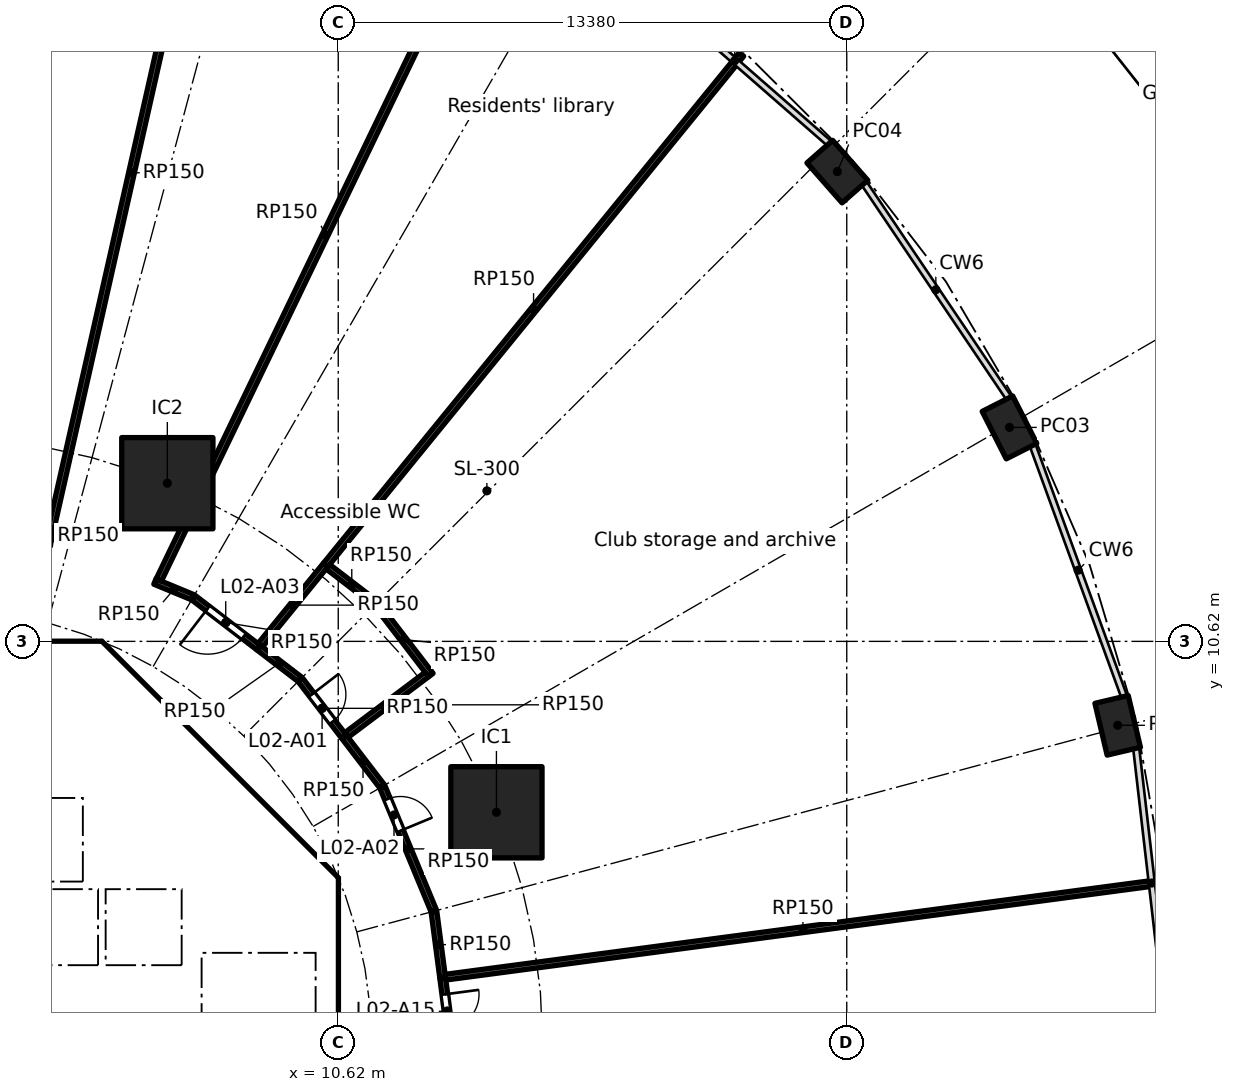
"""IFC4 building model, lengths in metres.
Left out: names, types, materials, properties, quantities, classifications, styles, units other than length and angle.
Written with IfcOpenShell. Run it as: python <this file> out.ifc"""

import sys

from ifc_helpers import new_model, si_unit, direction, frame, frame_2d, origin, origin_2d, place, context, subcontext, project, spatial, polyline, rectangle, hollow_rectangle, outline, extrude, element, fill, save


model = new_model("IFC4")
c1 = context("Model", 3, precision=1e-05, world=origin(), true_north=direction((0.0, 1.0)))
c2 = subcontext(c1, "Body", "Model", "MODEL_VIEW")
j1 = project(units=[si_unit("LENGTHUNIT", "METRE"), si_unit("PLANEANGLEUNIT", "RADIAN")], contexts=[c1])
p1 = place(None, origin())
s1 = spatial("IfcSite", under=j1, at=p1, CompositionType="ELEMENT")
p2 = place(p1, origin())
s2 = spatial("IfcBuilding", under=s1, at=p2, CompositionType="ELEMENT")
p3 = place(p2, frame((0.0, 0.0, 12.0)))
s3 = spatial("IfcBuildingStorey", under=s2, at=p3, CompositionType="ELEMENT", Elevation=12.0)
for number, where, z_axis, x_axis in (
    (1, (31.129, 8.412, 0.0), (0.0, 0.0, 1.0), (-0.229, 0.973, 0.0)),
    (2, (28.282, 16.25, 0.0), (0.0, 0.0, 1.0), (-0.452, 0.892, 0.0)),
    (3, (23.752, 22.981, 0.0), (0.0, 0.0, 1.0), (-0.66, 0.751, 0.0)),
):
    element("IfcColumn", number, at=place(p3, frame(where, z_axis=z_axis, x_axis=x_axis)), inside=s3, PredefinedType="COLUMN", context=c2, shape_type="SweptSolid", body=[
        extrude(hollow_rectangle(XDim=1.4, YDim=0.9, WallThickness=0.05, at=origin_2d()), origin(), (0.0, 0.0, 1.0), 5.0),
    ])
for number, where, z_axis, x_axis in (
    (4, (14.782, 6.123, 0.0), (0.0, 0.0, 1.0), (1.0, 0.0, 0.0)),
    (5, (6.123, 14.782, 0.0), (0.0, 0.0, 1.0), (1.0, 0.0, 0.0)),
):
    element("IfcColumn", number, at=place(p3, frame(where, z_axis=z_axis, x_axis=x_axis)), inside=s3, PredefinedType="COLUMN", context=c2, shape_type="SweptSolid", body=[
        extrude(rectangle(XDim=2.4, YDim=2.4, at=origin_2d()), origin(), (0.0, 0.0, 1.0), 5.0),
    ])
p4 = place(p3, frame((9.988, 4.613, 0.0), z_axis=(0.0, 0.0, 1.0), x_axis=(-0.707106781187, 0.707106781187, 0.0)))
e6 = element("IfcWall", 6, at=p4, inside=s3, PredefinedType="SHEAR", context=c2, shape_type="SweptSolid", body=[
    extrude(rectangle(XDim=7.602, YDim=0.6, at=frame_2d((3.801, 0.0))), origin(), (0.0, 0.0, 1.0), 4.7),
])
p5 = place(p4, frame((3.201, 0.0, 0.0)))
e7 = element("IfcOpeningElement", 7, at=p5, cuts=e6, PredefinedType="OPENING", context=c2, shape_type="SweptSolid", body=[
    extrude(rectangle(XDim=1.2, YDim=2.1, at=frame_2d((0.6, 1.05))), frame((0.0, 0.31, 0.0), z_axis=(0.0, -1.0, 0.0), x_axis=(1.0, 0.0, 0.0)), (0.0, 0.0, 1.0), 0.62),
])
p6 = place(p3, frame((4.0, 4.3, 0.0), z_axis=(0.0, 0.0, 1.0), x_axis=(0.0, 1.0, 0.0)))
e8 = element("IfcWall", 8, at=p6, inside=s3, PredefinedType="SOLIDWALL", context=c2, shape_type="SweptSolid", body=[
    extrude(rectangle(XDim=2.2, YDim=0.2, at=frame_2d((1.1, 0.0))), origin(), (0.0, 0.0, 1.0), 4.7),
])
p7 = place(p6, frame((0.55, 0.0, 0.0)))
e9 = element("IfcOpeningElement", 9, at=p7, cuts=e8, PredefinedType="OPENING", context=c2, shape_type="SweptSolid", body=[
    extrude(rectangle(XDim=1.1, YDim=2.1, at=frame_2d((0.55, 1.05))), frame((0.0, 0.11, 0.0), z_axis=(0.0, -1.0, 0.0), x_axis=(1.0, 0.0, 0.0)), (0.0, 0.0, 1.0), 0.22),
])
p8 = place(p3, frame((-6.7, 2.0, 0.0), z_axis=(0.0, 0.0, 1.0), x_axis=(1.0, 0.0, 0.0)))
e10 = element("IfcWall", 10, at=p8, inside=s3, PredefinedType="SOLIDWALL", context=c2, shape_type="SweptSolid", body=[
    extrude(rectangle(XDim=13.4, YDim=0.2, at=frame_2d((6.7, 0.0))), origin(), (0.0, 0.0, 1.0), 4.7),
])
p9 = place(p8, frame((0.65, 0.0, 0.0)))
e11 = element("IfcOpeningElement", 11, at=p9, cuts=e10, PredefinedType="OPENING", context=c2, shape_type="SweptSolid", body=[
    extrude(rectangle(XDim=1.1, YDim=2.1, at=frame_2d((0.55, 1.05))), frame((0.0, 0.11, 0.0), z_axis=(0.0, -1.0, 0.0), x_axis=(1.0, 0.0, 0.0)), (0.0, 0.0, 1.0), 0.22),
])
p10 = place(p8, frame((2.85, 0.0, 0.0)))
e12 = element("IfcOpeningElement", 12, at=p10, cuts=e10, PredefinedType="OPENING", context=c2, shape_type="SweptSolid", body=[
    extrude(rectangle(XDim=1.1, YDim=2.1, at=frame_2d((0.55, 1.05))), frame((0.0, 0.11, 0.0), z_axis=(0.0, -1.0, 0.0), x_axis=(1.0, 0.0, 0.0)), (0.0, 0.0, 1.0), 0.22),
])
p11 = place(p8, frame((5.05, 0.0, 0.0)))
e13 = element("IfcOpeningElement", 13, at=p11, cuts=e10, PredefinedType="OPENING", context=c2, shape_type="SweptSolid", body=[
    extrude(rectangle(XDim=1.1, YDim=2.1, at=frame_2d((0.55, 1.05))), frame((0.0, 0.11, 0.0), z_axis=(0.0, -1.0, 0.0), x_axis=(1.0, 0.0, 0.0)), (0.0, 0.0, 1.0), 0.22),
])
p12 = place(p3, frame((6.7, 4.0, 0.0), z_axis=(0.0, 0.0, 1.0), x_axis=(1.0, 0.0, 0.0)))
e14 = element("IfcWall", 14, at=p12, inside=s3, PredefinedType="SOLIDWALL", context=c2, shape_type="SweptSolid", body=[
    extrude(rectangle(XDim=3.325, YDim=0.2, at=frame_2d((1.662, 0.0))), origin(), (0.0, 0.0, 1.0), 4.7),
])
p13 = place(p12, frame((1.25, 0.0, 0.0)))
e15 = element("IfcOpeningElement", 15, at=p13, cuts=e14, PredefinedType="OPENING", context=c2, shape_type="SweptSolid", body=[
    extrude(rectangle(XDim=1.1, YDim=2.1, at=frame_2d((0.55, 1.05))), frame((0.0, 0.11, 0.0), z_axis=(0.0, -1.0, 0.0), x_axis=(1.0, 0.0, 0.0)), (0.0, 0.0, 1.0), 0.22),
])
p14 = place(p3, frame((4.0, 7.025, 0.0), z_axis=(0.0, 0.0, 1.0), x_axis=(0.0, 1.0, 0.0)))
e16 = element("IfcWall", 16, at=p14, inside=s3, PredefinedType="SOLIDWALL", context=c2, shape_type="SweptSolid", body=[
    extrude(rectangle(XDim=3.0, YDim=0.2, at=frame_2d((1.5, 0.0))), origin(), (0.0, 0.0, 1.0), 4.7),
])
p15 = place(p14, frame((0.925, 0.0, 0.0)))
e17 = element("IfcOpeningElement", 17, at=p15, cuts=e16, PredefinedType="OPENING", context=c2, shape_type="SweptSolid", body=[
    extrude(rectangle(XDim=1.1, YDim=2.1, at=frame_2d((0.55, 1.05))), frame((0.0, 0.11, 0.0), z_axis=(0.0, -1.0, 0.0), x_axis=(1.0, 0.0, 0.0)), (0.0, 0.0, 1.0), 0.22),
])
p16 = place(p3, origin())
e18 = element("IfcWall", 18, at=p16, inside=s3, PredefinedType="SHEAR", context=c2, shape_type="SweptSolid", body=[
    extrude(outline(polyline([(-4.152, 10.025), (-4.401, 9.776), (-4.825, 10.2), (-4.401, 10.625), (4.401, 10.625), (4.825, 10.2), (4.401, 9.776), (4.152, 10.025), (-4.152, 10.025)])), origin(), (0.0, 0.0, 1.0), 4.7),
])
p17 = place(p3, origin())
e19 = element("IfcWall", 19, at=p17, inside=s3, PredefinedType="SHEAR", context=c2, shape_type="SweptSolid", body=[
    extrude(outline(polyline([(9.776, -4.401), (10.025, -4.152), (10.025, -3.801), (10.025, 4.152), (9.776, 4.401), (10.2, 4.825), (10.625, 4.401), (10.625, -4.401), (10.2, -4.825), (9.776, -4.401)])), origin(), (0.0, 0.0, 1.0), 4.7),
])
p18 = place(p3, origin())
e20 = element("IfcWall", 20, at=p18, inside=s3, PredefinedType="SOLIDWALL", context=c2, shape_type="SweptSolid", body=[
    extrude(outline(polyline([(-6.5, 2.1), (-6.7, 2.1), (-6.7, 4.3), (6.7, 4.3), (6.7, 2.1), (6.5, 2.1), (6.5, 4.1), (4.5, 4.1), (4.5, 2.1), (4.3, 2.1), (4.3, 4.1), (2.3, 4.1), (2.3, 2.1), (2.1, 2.1), (2.1, 4.1), (0.1, 4.1), (0.1, 2.1), (-0.1, 2.1), (-0.1, 4.1), (-2.1, 4.1), (-2.1, 2.1), (-2.3, 2.1), (-2.3, 4.1), (-4.3, 4.1), (-4.3, 2.1), (-4.5, 2.1), (-4.5, 4.1), (-6.5, 4.1), (-6.5, 2.1)])), origin(), (0.0, 0.0, 1.0), 4.7),
])
p19 = place(p3, origin())
e21 = element("IfcWall", 21, at=p19, inside=s3, PredefinedType="SOLIDWALL", context=c2, shape_type="SweptSolid", body=[
    extrude(outline(polyline([(4.1, 6.5), (-4.1, 6.5), (-4.1, 7.025), (4.1, 7.025), (4.1, 6.5)])), origin(), (0.0, 0.0, 1.0), 4.7),
])
p20 = place(p3, origin())
e22 = element("IfcWall", 22, at=p20, inside=s3, PredefinedType="SOLIDWALL", context=c2, shape_type="SweptSolid", body=[
    extrude(outline(polyline([(7.025, -3.9), (6.7, -3.9), (6.7, 3.9), (7.025, 3.9), (7.025, -3.9)])), origin(), (0.0, 0.0, 1.0), 4.7),
])
p21 = place(p3, frame((2.998, 13.281, 0.0), z_axis=(0.0, 0.0, 1.0), x_axis=(0.220191699756, 0.975456618901, 0.0)))
e23 = element("IfcWall", 23, at=p21, inside=s3, PredefinedType="PARTITIONING", context=c2, shape_type="SweptSolid", body=[
    extrude(rectangle(XDim=19.825, YDim=0.15, at=frame_2d((9.912, 0.0))), origin(), (0.0, 0.0, 1.0), 4.7),
])
p22 = place(p3, frame((5.795, 12.194, 0.0), z_axis=(0.0, 0.0, 1.0), x_axis=(0.923867429555, -0.382712650179, 0.0)))
e24 = element("IfcWall", 24, at=p22, inside=s3, PredefinedType="PARTITIONING", context=c2, shape_type="SweptSolid", body=[
    extrude(rectangle(XDim=1.075, YDim=0.15, at=frame_2d((0.538, 0.0))), origin(), (0.0, 0.0, 1.0), 4.7),
])
p23 = place(p3, frame((6.809, 11.771, 0.0), z_axis=(0.0, 0.0, 1.0), x_axis=(0.793372937326, -0.608735888805, 0.0)))
e25 = element("IfcWall", 25, at=p23, inside=s3, PredefinedType="PARTITIONING", context=c2, shape_type="SweptSolid", body=[
    extrude(rectangle(XDim=2.155, YDim=0.15, at=frame_2d((1.078, 0.0))), origin(), (0.0, 0.0, 1.0), 4.7),
])
p24 = place(p23, frame((0.472, 0.0, 0.0)))
e26 = element("IfcOpeningElement", 26, at=p24, cuts=e25, PredefinedType="OPENING", context=c2, shape_type="SweptSolid", body=[
    extrude(rectangle(XDim=1.2, YDim=2.1, at=frame_2d((0.6, 1.05))), frame((0.0, 0.085, 0.0), z_axis=(0.0, -1.0, 0.0), x_axis=(1.0, 0.0, 0.0)), (0.0, 0.0, 1.0), 0.17),
])
p25 = place(p3, frame((8.519, 10.459, 0.0), z_axis=(0.0, 0.0, 1.0), x_axis=(0.793371316762, -0.6087380009, 0.0)))
e27 = element("IfcWall", 27, at=p25, inside=s3, PredefinedType="PARTITIONING", context=c2, shape_type="SweptSolid", body=[
    extrude(rectangle(XDim=1.371, YDim=0.15, at=frame_2d((0.686, 0.0))), origin(), (0.0, 0.0, 1.0), 4.7),
])
p26 = place(p3, frame((8.567, 10.517, 0.0), z_axis=(0.0, 0.0, 1.0), x_axis=(0.631573271363, 0.775316195432, 0.0)))
e28 = element("IfcWall", 28, at=p26, inside=s3, PredefinedType="PARTITIONING", context=c2, shape_type="SweptSolid", body=[
    extrude(rectangle(XDim=2.726, YDim=0.15, at=frame_2d((1.363, 0.0))), origin(), (0.0, 0.0, 1.0), 4.7),
])
p27 = place(p3, frame((9.624, 9.607, 0.0), z_axis=(0.0, 0.0, 1.0), x_axis=(0.608754453805, -0.793358692504, 0.0)))
e29 = element("IfcWall", 29, at=p27, inside=s3, PredefinedType="PARTITIONING", context=c2, shape_type="SweptSolid", body=[
    extrude(rectangle(XDim=1.888, YDim=0.15, at=frame_2d((0.944, 0.0))), origin(), (0.0, 0.0, 1.0), 4.7),
])
p28 = place(p27, frame((0.488, 0.0, 0.0)))
e30 = element("IfcOpeningElement", 30, at=p28, cuts=e29, PredefinedType="OPENING", context=c2, shape_type="SweptSolid", body=[
    extrude(rectangle(XDim=0.9, YDim=2.1, at=frame_2d((0.45, 1.05))), frame((0.0, 0.085, 0.0), z_axis=(0.0, -1.0, 0.0), x_axis=(1.0, 0.0, 0.0)), (0.0, 0.0, 1.0), 0.17),
])
p29 = place(p3, frame((10.348, 12.585, 0.0), z_axis=(0.0, 0.0, 1.0), x_axis=(0.793328373205, -0.608793965368, 0.0)))
e31 = element("IfcWall", 31, at=p29, inside=s3, PredefinedType="PARTITIONING", context=c2, shape_type="SweptSolid", body=[
    extrude(rectangle(XDim=1.584, YDim=0.15, at=frame_2d((0.792, 0.0))), origin(), (0.0, 0.0, 1.0), 4.7),
])
p30 = place(p3, frame((10.288, 12.631, 0.0), z_axis=(0.0, 0.0, 1.0), x_axis=(0.631546535922, 0.77533797338, 0.0)))
e32 = element("IfcWall", 32, at=p30, inside=s3, PredefinedType="PARTITIONING", context=c2, shape_type="SweptSolid", body=[
    extrude(rectangle(XDim=17.325, YDim=0.15, at=frame_2d((8.663, 0.0))), origin(), (0.0, 0.0, 1.0), 4.7),
])
p31 = place(p3, frame((10.774, 8.109, 0.0), z_axis=(0.0, 0.0, 1.0), x_axis=(0.608716251771, -0.793388003961, 0.0)))
e33 = element("IfcWall", 33, at=p31, inside=s3, PredefinedType="PARTITIONING", context=c2, shape_type="SweptSolid", body=[
    extrude(rectangle(XDim=1.638, YDim=0.15, at=frame_2d((0.819, 0.0))), origin(), (0.0, 0.0, 1.0), 4.7),
])
p32 = place(p3, frame((11.621, 11.604, 0.0), z_axis=(0.0, 0.0, 1.0), x_axis=(0.608759688573, -0.793354675771, 0.0)))
e34 = element("IfcWall", 34, at=p32, inside=s3, PredefinedType="PARTITIONING", context=c2, shape_type="SweptSolid", body=[
    extrude(rectangle(XDim=2.358, YDim=0.15, at=frame_2d((1.179, 0.0))), origin(), (0.0, 0.0, 1.0), 4.7),
])
p33 = place(p3, frame((11.782, 6.789, 0.0), z_axis=(0.0, 0.0, 1.0), x_axis=(0.382677866108, -0.923881838111, 0.0)))
e35 = element("IfcWall", 35, at=p33, inside=s3, PredefinedType="PARTITIONING", context=c2, shape_type="SweptSolid", body=[
    extrude(rectangle(XDim=3.527, YDim=0.15, at=frame_2d((1.763, 0.0))), origin(), (0.0, 0.0, 1.0), 4.7),
])
p34 = place(p33, frame((0.346, 0.0, 0.0)))
e36 = element("IfcOpeningElement", 36, at=p34, cuts=e35, PredefinedType="OPENING", context=c2, shape_type="SweptSolid", body=[
    extrude(rectangle(XDim=0.9, YDim=2.1, at=frame_2d((0.45, 1.05))), frame((0.0, 0.085, 0.0), z_axis=(0.0, -1.0, 0.0), x_axis=(1.0, 0.0, 0.0)), (0.0, 0.0, 1.0), 0.17),
])
p35 = place(p3, frame((12.951, 9.748, 0.0), z_axis=(0.0, 0.0, 1.0), x_axis=(-0.798970748419, -0.601369888813, 0.0)))
e37 = element("IfcWall", 37, at=p35, inside=s3, PredefinedType="PARTITIONING", context=c2, shape_type="SweptSolid", body=[
    extrude(rectangle(XDim=2.65, YDim=0.15, at=frame_2d((1.325, 0.0))), origin(), (0.0, 0.0, 1.0), 4.7),
])
p36 = place(p3, frame((13.138, 3.508, 0.0), z_axis=(0.0, 0.0, 1.0), x_axis=(0.130526735914, -0.991444789795, 0.0)))
e38 = element("IfcWall", 38, at=p36, inside=s3, PredefinedType="PARTITIONING", context=c2, shape_type="SweptSolid", body=[
    extrude(rectangle(XDim=1.749, YDim=0.15, at=frame_2d((0.875, 0.0))), origin(), (0.0, 0.0, 1.0), 4.7),
])
p37 = place(p3, frame((13.366, 1.774, 0.0), z_axis=(0.0, 0.0, 1.0), x_axis=(0.130472275964, -0.991451958092, 0.0)))
e39 = element("IfcWall", 39, at=p37, inside=s3, PredefinedType="PARTITIONING", context=c2, shape_type="SweptSolid", body=[
    extrude(rectangle(XDim=1.778, YDim=0.15, at=frame_2d((0.889, 0.0))), origin(), (0.0, 0.0, 1.0), 4.7),
])
p38 = place(p37, frame((0.445, 0.0, 0.0)))
e40 = element("IfcOpeningElement", 40, at=p38, cuts=e39, PredefinedType="OPENING", context=c2, shape_type="SweptSolid", body=[
    extrude(rectangle(XDim=0.9, YDim=2.1, at=frame_2d((0.45, 1.05))), frame((0.0, 0.085, 0.0), z_axis=(0.0, -1.0, 0.0), x_axis=(1.0, 0.0, 0.0)), (0.0, 0.0, 1.0), 0.17),
])
p39 = place(p3, frame((14.654, 30.398, 0.0), z_axis=(0.0, 0.0, 1.0), x_axis=(-0.434261119912, -0.900787033506, 0.0)))
e41 = element("IfcWall", 41, at=p39, inside=s3, PredefinedType="PARTITIONING", context=c2, shape_type="SweptSolid", body=[
    extrude(rectangle(XDim=20.166, YDim=0.15, at=frame_2d((10.083, 0.0))), origin(), (0.0, 0.0, 1.0), 4.7),
])
p40 = place(p3, frame((32.253, 4.281, 0.0), z_axis=(0.0, 0.0, 1.0), x_axis=(-0.991305479384, -0.131580570535, 0.0)))
e42 = element("IfcWall", 42, at=p40, inside=s3, PredefinedType="PARTITIONING", context=c2, shape_type="SweptSolid", body=[
    extrude(rectangle(XDim=18.978, YDim=0.15, at=frame_2d((9.489, 0.0))), origin(), (0.0, 0.0, 1.0), 4.7),
])
p41 = place(p7, origin())
e43 = element("IfcDoor", 43, at=p41, inside=s3, OperationType="DOUBLE_DOOR_SLIDING", PredefinedType="DOOR", context=c2, shape_type="SweptSolid", body=[
    extrude(rectangle(XDim=1.1, YDim=2.1, at=frame_2d((0.55, 1.05))), frame((0.0, 0.025, 0.0), z_axis=(0.0, -1.0, 0.0), x_axis=(1.0, 0.0, 0.0)), (0.0, 0.0, 1.0), 0.05),
])
fill(e9, e43)
p42 = place(p13, frame((1.1, 0.0, 0.0), x_axis=(-1.0, 0.0, 0.0)))
e44 = element("IfcDoor", 44, at=p42, inside=s3, OperationType="SINGLE_SWING_LEFT", PredefinedType="DOOR", context=c2, shape_type="SweptSolid", body=[
    extrude(rectangle(XDim=1.1, YDim=2.1, at=frame_2d((0.55, 1.05))), frame((0.0, 0.025, 0.0), z_axis=(0.0, -1.0, 0.0), x_axis=(1.0, 0.0, 0.0)), (0.0, 0.0, 1.0), 0.05),
])
fill(e15, e44)
p43 = place(p15, origin())
e45 = element("IfcDoor", 45, at=p43, inside=s3, OperationType="SINGLE_SWING_RIGHT", PredefinedType="DOOR", context=c2, shape_type="SweptSolid", body=[
    extrude(rectangle(XDim=1.1, YDim=2.1, at=frame_2d((0.55, 1.05))), frame((0.0, 0.025, 0.0), z_axis=(0.0, -1.0, 0.0), x_axis=(1.0, 0.0, 0.0)), (0.0, 0.0, 1.0), 0.05),
])
fill(e17, e45)
p44 = place(p5, origin())
e46 = element("IfcDoor", 46, at=p44, inside=s3, OperationType="SINGLE_SWING_RIGHT", PredefinedType="DOOR", context=c2, shape_type="SweptSolid", body=[
    extrude(rectangle(XDim=1.2, YDim=2.1, at=frame_2d((0.6, 1.05))), frame((0.0, 0.025, 0.0), z_axis=(0.0, -1.0, 0.0), x_axis=(1.0, 0.0, 0.0)), (0.0, 0.0, 1.0), 0.05),
])
fill(e7, e46)
p45 = place(p28, origin())
e47 = element("IfcDoor", 47, at=p45, inside=s3, OperationType="SINGLE_SWING_LEFT", PredefinedType="DOOR", context=c2, shape_type="SweptSolid", body=[
    extrude(rectangle(XDim=0.9, YDim=2.1, at=frame_2d((0.45, 1.05))), frame((0.0, 0.025, 0.0), z_axis=(0.0, -1.0, 0.0), x_axis=(1.0, 0.0, 0.0)), (0.0, 0.0, 1.0), 0.05),
])
fill(e30, e47)
p46 = place(p34, origin())
e48 = element("IfcDoor", 48, at=p46, inside=s3, OperationType="SINGLE_SWING_RIGHT", PredefinedType="DOOR", context=c2, shape_type="SweptSolid", body=[
    extrude(rectangle(XDim=0.9, YDim=2.1, at=frame_2d((0.45, 1.05))), frame((0.0, 0.025, 0.0), z_axis=(0.0, -1.0, 0.0), x_axis=(1.0, 0.0, 0.0)), (0.0, 0.0, 1.0), 0.05),
])
fill(e36, e48)
p47 = place(p24, frame((1.2, 0.0, 0.0), x_axis=(-1.0, 0.0, 0.0)))
e49 = element("IfcDoor", 49, at=p47, inside=s3, OperationType="SINGLE_SWING_RIGHT", PredefinedType="DOOR", context=c2, shape_type="SweptSolid", body=[
    extrude(rectangle(XDim=1.2, YDim=2.1, at=frame_2d((0.6, 1.05))), frame((0.0, 0.025, 0.0), z_axis=(0.0, -1.0, 0.0), x_axis=(1.0, 0.0, 0.0)), (0.0, 0.0, 1.0), 0.05),
])
fill(e26, e49)
p48 = place(p38, origin())
e50 = element("IfcDoor", 50, at=p48, inside=s3, OperationType="SINGLE_SWING_LEFT", PredefinedType="DOOR", context=c2, shape_type="SweptSolid", body=[
    extrude(rectangle(XDim=0.9, YDim=2.1, at=frame_2d((0.45, 1.05))), frame((0.0, 0.025, 0.0), z_axis=(0.0, -1.0, 0.0), x_axis=(1.0, 0.0, 0.0)), (0.0, 0.0, 1.0), 0.05),
])
fill(e40, e50)
save(model, sys.argv[1])
